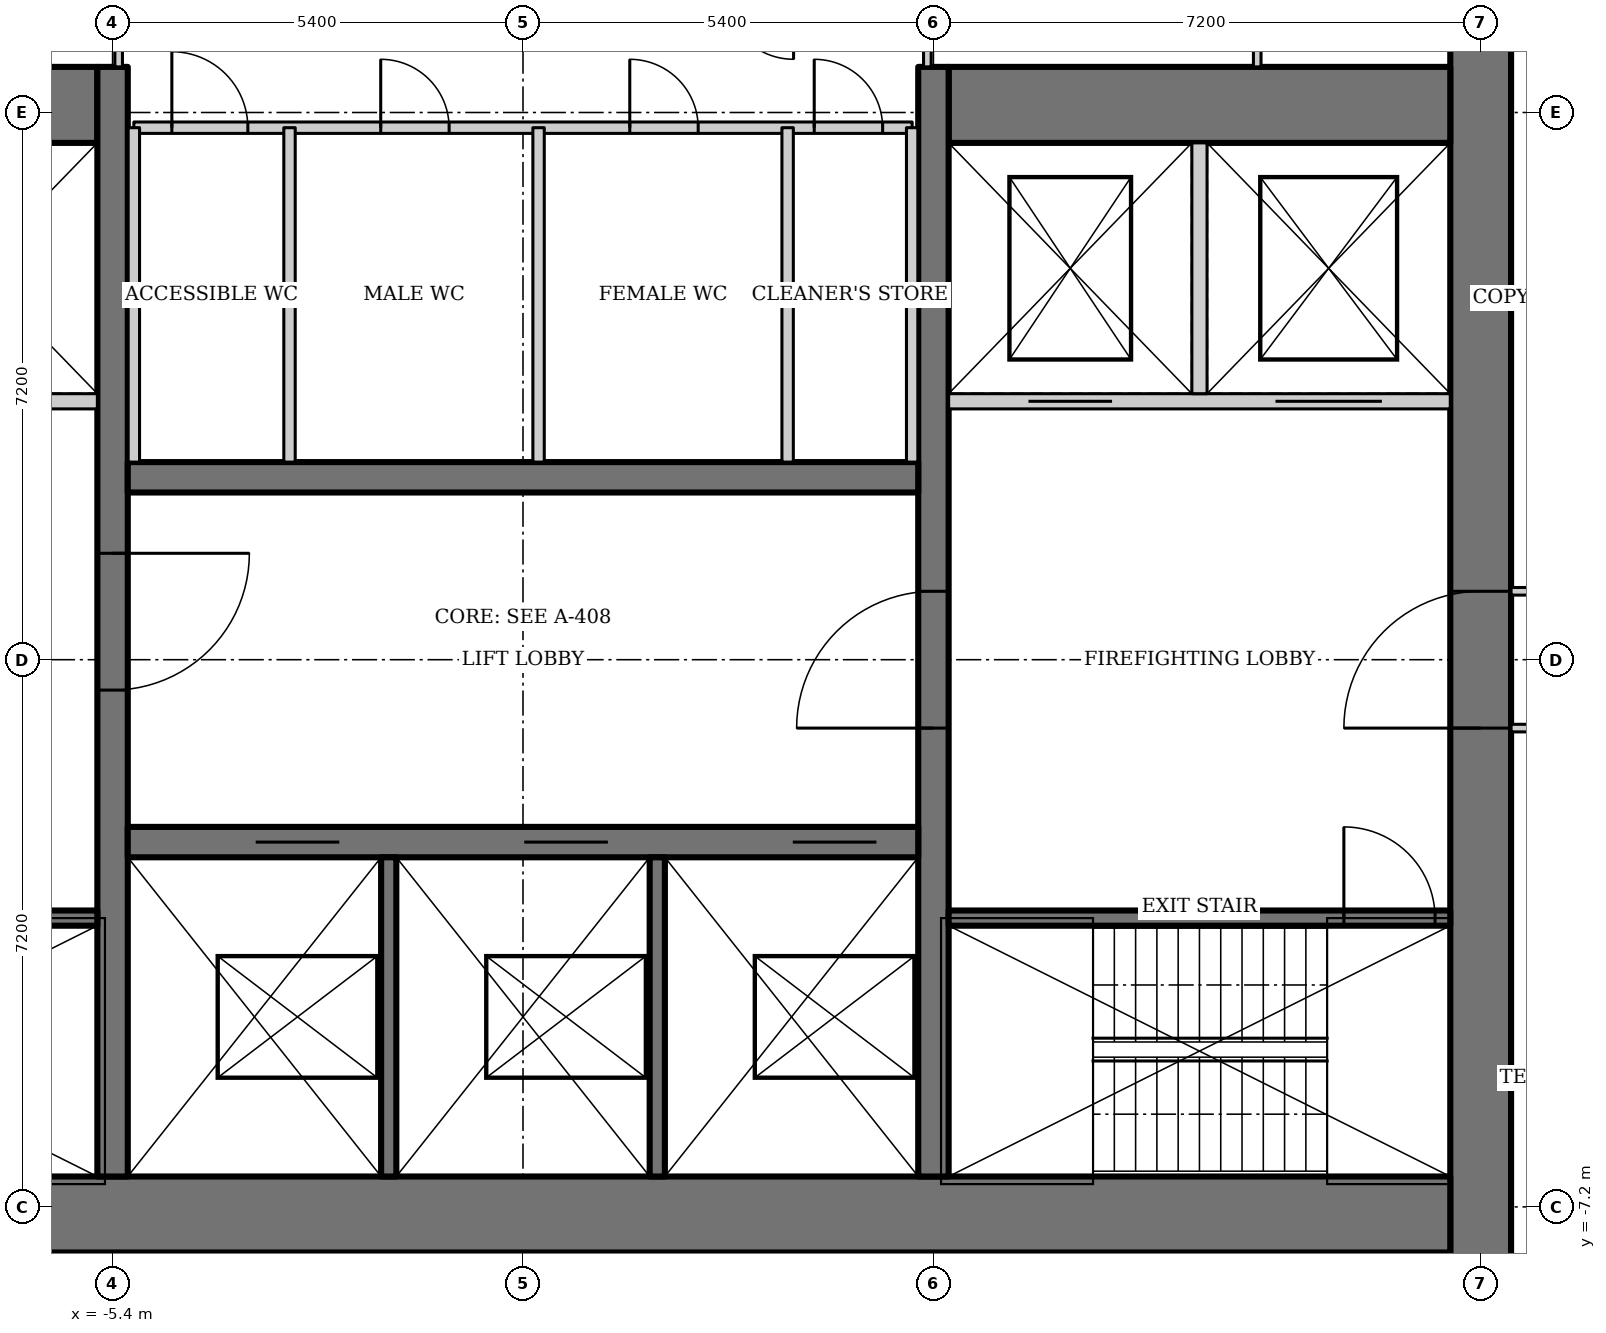
"""IFC4 building model, lengths in metres.
Left out: names, types, materials, properties, quantities, classifications, styles, units other than length and angle.
Written with IfcOpenShell. Run it as: python <this file> out.ifc"""

import sys

from ifc_helpers import new_model, si_unit, direction, frame, frame_2d, origin, place, context, subcontext, project, spatial, rectangle, extrude, element, fill, save


model = new_model("IFC4")
c1 = context("Model", 3, precision=1e-05, world=origin(), true_north=direction((0.0, 1.0)))
c2 = subcontext(c1, "Body", "Model", "MODEL_VIEW")
j1 = project(units=[si_unit("LENGTHUNIT", "METRE"), si_unit("PLANEANGLEUNIT", "RADIAN")], contexts=[c1])
p1 = place(None, origin())
s1 = spatial("IfcSite", under=j1, at=p1, CompositionType="ELEMENT")
p2 = place(p1, origin())
s2 = spatial("IfcBuilding", under=s1, at=p2, CompositionType="ELEMENT")
p3 = place(p2, frame((0.0, 0.0, 228.4)))
s3 = spatial("IfcBuildingStorey", under=s2, at=p3, CompositionType="ELEMENT", Elevation=228.4)
p4 = place(p3, frame((12.6, -13.0, 0.0), z_axis=(0.0, 0.0, 1.0), x_axis=(0.0, 1.0, 0.0)))
e1 = element("IfcWall", 1, at=p4, inside=s3, PredefinedType="SHEAR", context=c2, shape_type="SweptSolid", body=[
    extrude(rectangle(XDim=26.0, YDim=0.8, at=frame_2d((13.0, 0.0))), origin(), (0.0, 0.0, 1.0), 4.2),
])
p5 = place(p4, frame((12.1, 0.0, 0.0)))
e2 = element("IfcOpeningElement", 2, at=p5, cuts=e1, PredefinedType="OPENING", context=c2, shape_type="SweptSolid", body=[
    extrude(rectangle(XDim=1.8, YDim=2.1, at=frame_2d((0.9, 1.05))), frame((0.0, 0.41, 0.0), z_axis=(0.0, -1.0, 0.0), x_axis=(1.0, 0.0, 0.0)), (0.0, 0.0, 1.0), 0.82),
])
p6 = place(p3, frame((-12.2, -7.3, 0.0), z_axis=(0.0, 0.0, 1.0), x_axis=(1.0, 0.0, 0.0)))
e3 = element("IfcWall", 3, at=p6, inside=s3, PredefinedType="SHEAR", context=c2, shape_type="SweptSolid", body=[
    extrude(rectangle(XDim=24.4, YDim=1.0, at=frame_2d((12.2, 0.0))), origin(), (0.0, 0.0, 1.0), 4.2),
])
for number, where, z_axis, x_axis in (
    (4, (12.2, 7.3, 0.0), (0.0, 0.0, 1.0), (-1.0, 0.0, 0.0)),
    (5, (-5.6, 7.3, 0.0), (0.0, 0.0, 1.0), (-1.0, 0.0, 0.0)),
):
    element("IfcWall", number, at=place(p3, frame(where, z_axis=z_axis, x_axis=x_axis)), inside=s3, PredefinedType="SHEAR", context=c2, shape_type="SweptSolid", body=[
        extrude(rectangle(XDim=6.6, YDim=1.0, at=frame_2d((3.3, 0.0))), origin(), (0.0, 0.0, 1.0), 4.2),
    ])
p7 = place(p3, frame((5.4, -6.8, 0.0), z_axis=(0.0, 0.0, 1.0), x_axis=(0.0, 1.0, 0.0)))
e6 = element("IfcWall", 6, at=p7, inside=s3, PredefinedType="SHEAR", context=c2, shape_type="SweptSolid", body=[
    extrude(rectangle(XDim=14.6, YDim=0.4, at=frame_2d((7.3, 0.0))), origin(), (0.0, 0.0, 1.0), 4.2),
])
p8 = place(p7, frame((5.9, 0.0, 0.0)))
e7 = element("IfcOpeningElement", 7, at=p8, cuts=e6, PredefinedType="OPENING", context=c2, shape_type="SweptSolid", body=[
    extrude(rectangle(XDim=1.8, YDim=2.1, at=frame_2d((0.9, 1.05))), frame((0.0, 0.21, 0.0), z_axis=(0.0, -1.0, 0.0), x_axis=(1.0, 0.0, 0.0)), (0.0, 0.0, 1.0), 0.42),
])
p9 = place(p3, frame((-5.4, 7.8, 0.0), z_axis=(0.0, 0.0, 1.0), x_axis=(0.0, -1.0, 0.0)))
e8 = element("IfcWall", 8, at=p9, inside=s3, PredefinedType="SHEAR", context=c2, shape_type="SweptSolid", body=[
    extrude(rectangle(XDim=14.6, YDim=0.4, at=frame_2d((7.3, 0.0))), origin(), (0.0, 0.0, 1.0), 4.2),
])
p10 = place(p9, frame((6.4, 0.0, 0.0)))
e9 = element("IfcOpeningElement", 9, at=p10, cuts=e8, PredefinedType="OPENING", context=c2, shape_type="SweptSolid", body=[
    extrude(rectangle(XDim=1.8, YDim=2.1, at=frame_2d((0.9, 1.05))), frame((0.0, 0.21, 0.0), z_axis=(0.0, -1.0, 0.0), x_axis=(1.0, 0.0, 0.0)), (0.0, 0.0, 1.0), 0.42),
])
p11 = place(p3, frame((-5.2, -2.4, 0.0), z_axis=(0.0, 0.0, 1.0), x_axis=(1.0, 0.0, 0.0)))
e10 = element("IfcWall", 10, at=p11, inside=s3, PredefinedType="SHEAR", context=c2, shape_type="SweptSolid", body=[
    extrude(rectangle(XDim=10.4, YDim=0.4, at=frame_2d((5.2, 0.0))), origin(), (0.0, 0.0, 1.0), 4.2),
])
p12 = place(p11, frame((1.683, 0.0, 0.0)))
e11 = element("IfcOpeningElement", 11, at=p12, cuts=e10, PredefinedType="OPENING", context=c2, shape_type="SweptSolid", body=[
    extrude(rectangle(XDim=1.1, YDim=2.2, at=frame_2d((0.55, 1.1))), frame((0.0, 0.21, 0.0), z_axis=(0.0, -1.0, 0.0), x_axis=(1.0, 0.0, 0.0)), (0.0, 0.0, 1.0), 0.42),
])
p13 = place(p11, frame((5.217, 0.0, 0.0)))
e12 = element("IfcOpeningElement", 12, at=p13, cuts=e10, PredefinedType="OPENING", context=c2, shape_type="SweptSolid", body=[
    extrude(rectangle(XDim=1.1, YDim=2.2, at=frame_2d((0.55, 1.1))), frame((0.0, 0.21, 0.0), z_axis=(0.0, -1.0, 0.0), x_axis=(1.0, 0.0, 0.0)), (0.0, 0.0, 1.0), 0.42),
])
p14 = place(p11, frame((8.75, 0.0, 0.0)))
e13 = element("IfcOpeningElement", 13, at=p14, cuts=e10, PredefinedType="OPENING", context=c2, shape_type="SweptSolid", body=[
    extrude(rectangle(XDim=1.1, YDim=2.2, at=frame_2d((0.55, 1.1))), frame((0.0, 0.21, 0.0), z_axis=(0.0, -1.0, 0.0), x_axis=(1.0, 0.0, 0.0)), (0.0, 0.0, 1.0), 0.42),
])
for number, where, z_axis, x_axis in (
    (14, (-1.767, -2.6, 0.0), (0.0, 0.0, 1.0), (0.0, -1.0, 0.0)),
    (15, (1.767, -2.6, 0.0), (0.0, 0.0, 1.0), (0.0, -1.0, 0.0)),
):
    element("IfcWall", number, at=place(p3, frame(where, z_axis=z_axis, x_axis=x_axis)), inside=s3, PredefinedType="SOLIDWALL", context=c2, shape_type="SweptSolid", body=[
        extrude(rectangle(XDim=4.2, YDim=0.2, at=frame_2d((2.1, 0.0))), origin(), (0.0, 0.0, 1.0), 4.2),
    ])
p15 = place(p3, frame((5.2, 2.4, 0.0), z_axis=(0.0, 0.0, 1.0), x_axis=(-1.0, 0.0, 0.0)))
e16 = element("IfcWall", 16, at=p15, inside=s3, PredefinedType="SHEAR", context=c2, shape_type="SweptSolid", body=[
    extrude(rectangle(XDim=10.4, YDim=0.4, at=frame_2d((5.2, 0.0))), origin(), (0.0, 0.0, 1.0), 4.2),
])
p16 = place(p3, frame((5.6, -3.4, 0.0), z_axis=(0.0, 0.0, 1.0), x_axis=(1.0, 0.0, 0.0)))
e17 = element("IfcWall", 17, at=p16, inside=s3, PredefinedType="SHEAR", context=c2, shape_type="SweptSolid", body=[
    extrude(rectangle(XDim=6.6, YDim=0.2, at=frame_2d((3.3, 0.0))), origin(), (0.0, 0.0, 1.0), 4.2),
])
p17 = place(p16, frame((5.2, 0.0, 0.0)))
e18 = element("IfcOpeningElement", 18, at=p17, cuts=e17, PredefinedType="OPENING", context=c2, shape_type="SweptSolid", body=[
    extrude(rectangle(XDim=1.2, YDim=2.1, at=frame_2d((0.6, 1.05))), frame((0.0, 0.11, 0.0), z_axis=(0.0, -1.0, 0.0), x_axis=(1.0, 0.0, 0.0)), (0.0, 0.0, 1.0), 0.22),
])
p18 = place(p3, frame((12.2, 3.4, 0.0), z_axis=(0.0, 0.0, 1.0), x_axis=(-1.0, 0.0, 0.0)))
e19 = element("IfcWall", 19, at=p18, inside=s3, PredefinedType="SOLIDWALL", context=c2, shape_type="SweptSolid", body=[
    extrude(rectangle(XDim=6.6, YDim=0.2, at=frame_2d((3.3, 0.0))), origin(), (0.0, 0.0, 1.0), 4.2),
])
p19 = place(p18, frame((4.45, 0.0, 0.0)))
e20 = element("IfcOpeningElement", 20, at=p19, cuts=e19, PredefinedType="OPENING", context=c2, shape_type="SweptSolid", body=[
    extrude(rectangle(XDim=1.1, YDim=2.2, at=frame_2d((0.55, 1.1))), frame((0.0, 0.11, 0.0), z_axis=(0.0, -1.0, 0.0), x_axis=(1.0, 0.0, 0.0)), (0.0, 0.0, 1.0), 0.22),
])
p20 = place(p18, frame((0.9, 0.0, 0.0)))
e21 = element("IfcOpeningElement", 21, at=p20, cuts=e19, PredefinedType="OPENING", context=c2, shape_type="SweptSolid", body=[
    extrude(rectangle(XDim=1.4, YDim=2.2, at=frame_2d((0.7, 1.1))), frame((0.0, 0.11, 0.0), z_axis=(0.0, -1.0, 0.0), x_axis=(1.0, 0.0, 0.0)), (0.0, 0.0, 1.0), 0.22),
])
p21 = place(p3, frame((8.9, 3.5, 0.0), z_axis=(0.0, 0.0, 1.0), x_axis=(0.0, 1.0, 0.0)))
e22 = element("IfcWall", 22, at=p21, inside=s3, PredefinedType="SOLIDWALL", context=c2, shape_type="SweptSolid", body=[
    extrude(rectangle(XDim=3.3, YDim=0.2, at=frame_2d((1.65, 0.0))), origin(), (0.0, 0.0, 1.0), 4.2),
])
p22 = place(p3, frame((-5.6, -3.4, 0.0), z_axis=(0.0, 0.0, 1.0), x_axis=(-1.0, 0.0, 0.0)))
e23 = element("IfcWall", 23, at=p22, inside=s3, PredefinedType="SHEAR", context=c2, shape_type="SweptSolid", body=[
    extrude(rectangle(XDim=6.6, YDim=0.2, at=frame_2d((3.3, 0.0))), origin(), (0.0, 0.0, 1.0), 4.2),
])
p23 = place(p22, frame((5.2, 0.0, 0.0)))
e24 = element("IfcOpeningElement", 24, at=p23, cuts=e23, PredefinedType="OPENING", context=c2, shape_type="SweptSolid", body=[
    extrude(rectangle(XDim=1.2, YDim=2.1, at=frame_2d((0.6, 1.05))), frame((0.0, 0.11, 0.0), z_axis=(0.0, -1.0, 0.0), x_axis=(1.0, 0.0, 0.0)), (0.0, 0.0, 1.0), 0.22),
])
p24 = place(p3, frame((-12.2, 3.4, 0.0), z_axis=(0.0, 0.0, 1.0), x_axis=(1.0, 0.0, 0.0)))
e25 = element("IfcWall", 25, at=p24, inside=s3, PredefinedType="SOLIDWALL", context=c2, shape_type="SweptSolid", body=[
    extrude(rectangle(XDim=6.6, YDim=0.2, at=frame_2d((3.3, 0.0))), origin(), (0.0, 0.0, 1.0), 4.2),
])
p25 = place(p24, frame((1.05, 0.0, 0.0)))
e26 = element("IfcOpeningElement", 26, at=p25, cuts=e25, PredefinedType="OPENING", context=c2, shape_type="SweptSolid", body=[
    extrude(rectangle(XDim=1.1, YDim=2.2, at=frame_2d((0.55, 1.1))), frame((0.0, 0.11, 0.0), z_axis=(0.0, -1.0, 0.0), x_axis=(1.0, 0.0, 0.0)), (0.0, 0.0, 1.0), 0.22),
])
p26 = place(p24, frame((4.3, 0.0, 0.0)))
e27 = element("IfcOpeningElement", 27, at=p26, cuts=e25, PredefinedType="OPENING", context=c2, shape_type="SweptSolid", body=[
    extrude(rectangle(XDim=1.4, YDim=2.2, at=frame_2d((0.7, 1.1))), frame((0.0, 0.11, 0.0), z_axis=(0.0, -1.0, 0.0), x_axis=(1.0, 0.0, 0.0)), (0.0, 0.0, 1.0), 0.22),
])
p27 = place(p3, frame((-5.12, 7.0, 0.0), z_axis=(0.0, 0.0, 1.0), x_axis=(1.0, 0.0, 0.0)))
e28 = element("IfcWall", 28, at=p27, inside=s3, PredefinedType="SOLIDWALL", context=c2, shape_type="SweptSolid", body=[
    extrude(rectangle(XDim=10.24, YDim=0.15, at=frame_2d((5.12, 0.0))), origin(), (0.0, 0.0, 1.0), 4.05),
])
p28 = place(p27, frame((0.5, 0.0, 0.0)))
e29 = element("IfcOpeningElement", 29, at=p28, cuts=e28, PredefinedType="OPENING", context=c2, shape_type="SweptSolid", body=[
    extrude(rectangle(XDim=1.0, YDim=2.1, at=frame_2d((0.5, 1.05))), frame((0.0, 0.085, 0.0), z_axis=(0.0, -1.0, 0.0), x_axis=(1.0, 0.0, 0.0)), (0.0, 0.0, 1.0), 0.17),
])
p29 = place(p27, frame((3.248, 0.0, 0.0)))
e30 = element("IfcOpeningElement", 30, at=p29, cuts=e28, PredefinedType="OPENING", context=c2, shape_type="SweptSolid", body=[
    extrude(rectangle(XDim=0.9, YDim=2.1, at=frame_2d((0.45, 1.05))), frame((0.0, 0.085, 0.0), z_axis=(0.0, -1.0, 0.0), x_axis=(1.0, 0.0, 0.0)), (0.0, 0.0, 1.0), 0.17),
])
p30 = place(p27, frame((6.525, 0.0, 0.0)))
e31 = element("IfcOpeningElement", 31, at=p30, cuts=e28, PredefinedType="OPENING", context=c2, shape_type="SweptSolid", body=[
    extrude(rectangle(XDim=0.9, YDim=2.1, at=frame_2d((0.45, 1.05))), frame((0.0, 0.085, 0.0), z_axis=(0.0, -1.0, 0.0), x_axis=(1.0, 0.0, 0.0)), (0.0, 0.0, 1.0), 0.17),
])
p31 = place(p27, frame((8.952, 0.0, 0.0)))
e32 = element("IfcOpeningElement", 32, at=p31, cuts=e28, PredefinedType="OPENING", context=c2, shape_type="SweptSolid", body=[
    extrude(rectangle(XDim=0.9, YDim=2.1, at=frame_2d((0.45, 1.05))), frame((0.0, 0.085, 0.0), z_axis=(0.0, -1.0, 0.0), x_axis=(1.0, 0.0, 0.0)), (0.0, 0.0, 1.0), 0.17),
])
for number, where, z_axis, x_axis in (
    (33, (-5.12, 2.6, 0.0), (0.0, 0.0, 1.0), (0.0, 1.0, 0.0)),
    (34, (5.12, 2.6, 0.0), (0.0, 0.0, 1.0), (0.0, 1.0, 0.0)),
    (35, (-3.072, 2.6, 0.0), (0.0, 0.0, 1.0), (0.0, 1.0, 0.0)),
    (36, (0.205, 2.6, 0.0), (0.0, 0.0, 1.0), (0.0, 1.0, 0.0)),
    (37, (3.482, 2.6, 0.0), (0.0, 0.0, 1.0), (0.0, 1.0, 0.0)),
):
    element("IfcWall", number, at=place(p3, frame(where, z_axis=z_axis, x_axis=x_axis)), inside=s3, PredefinedType="SOLIDWALL", context=c2, shape_type="SweptSolid", body=[
        extrude(rectangle(XDim=4.4, YDim=0.15, at=frame_2d((2.2, 0.0))), origin(), (0.0, 0.0, 1.0), 4.05),
    ])
p32 = place(p3, frame((5.32, 7.8, 0.0), z_axis=(0.0, 0.0, 1.0), x_axis=(0.0, 1.0, 0.0)))
e38 = element("IfcWall", 38, at=p32, inside=s3, PredefinedType="PARTITIONING", context=c2, shape_type="SweptSolid", body=[
    extrude(rectangle(XDim=1.0, YDim=0.1, at=frame_2d((0.5, 0.0))), origin(), (0.0, 0.0, 1.0), 4.05),
])
p33 = place(p3, frame((9.66, 10.017, 0.0), z_axis=(0.0, 0.0, 1.0), x_axis=(0.0, -1.0, 0.0)))
e39 = element("IfcWall", 39, at=p33, inside=s3, PredefinedType="PARTITIONING", context=c2, shape_type="SweptSolid", body=[
    extrude(rectangle(XDim=2.217, YDim=0.1, at=frame_2d((1.108, 0.0))), origin(), (0.0, 0.0, 1.0), 4.05),
])
p34 = place(p3, frame((-5.32, 8.8, 0.0), z_axis=(0.0, 0.0, 1.0), x_axis=(0.0, -1.0, 0.0)))
e40 = element("IfcWall", 40, at=p34, inside=s3, PredefinedType="PARTITIONING", context=c2, shape_type="SweptSolid", body=[
    extrude(rectangle(XDim=1.0, YDim=0.1, at=frame_2d((0.5, 0.0))), origin(), (0.0, 0.0, 1.0), 4.05),
])
p35 = place(p3, frame((13.0, -0.9, 0.0), z_axis=(0.0, 0.0, 1.0), x_axis=(1.0, 0.0, 0.0)))
e41 = element("IfcWall", 41, at=p35, inside=s3, PredefinedType="PARTITIONING", context=c2, shape_type="SweptSolid", body=[
    extrude(rectangle(XDim=2.165, YDim=0.1, at=frame_2d((1.083, 0.0))), origin(), (0.0, 0.0, 1.0), 4.05),
])
p36 = place(p35, frame((1.15, 0.0, 0.0)))
e42 = element("IfcOpeningElement", 42, at=p36, cuts=e41, PredefinedType="OPENING", context=c2, shape_type="SweptSolid", body=[
    extrude(rectangle(XDim=0.9, YDim=2.1, at=frame_2d((0.45, 1.05))), frame((0.0, 0.06, 0.0), z_axis=(0.0, -1.0, 0.0), x_axis=(1.0, 0.0, 0.0)), (0.0, 0.0, 1.0), 0.12),
])
p37 = place(p3, frame((15.165, 0.9, 0.0), z_axis=(0.0, 0.0, 1.0), x_axis=(-1.0, 0.0, 0.0)))
e43 = element("IfcWall", 43, at=p37, inside=s3, PredefinedType="PARTITIONING", context=c2, shape_type="SweptSolid", body=[
    extrude(rectangle(XDim=2.165, YDim=0.1, at=frame_2d((1.083, 0.0))), origin(), (0.0, 0.0, 1.0), 4.05),
])
p38 = place(p37, frame((0.1, 0.0, 0.0)))
e44 = element("IfcOpeningElement", 44, at=p38, cuts=e43, PredefinedType="OPENING", context=c2, shape_type="SweptSolid", body=[
    extrude(rectangle(XDim=0.9, YDim=2.1, at=frame_2d((0.45, 1.05))), frame((0.0, 0.06, 0.0), z_axis=(0.0, -1.0, 0.0), x_axis=(1.0, 0.0, 0.0)), (0.0, 0.0, 1.0), 0.12),
])
p39 = place(p8, origin())
e45 = element("IfcDoor", 45, at=p39, inside=s3, OperationType="DOUBLE_DOOR_DOUBLE_SWING", PredefinedType="DOOR", context=c2, shape_type="SweptSolid", body=[
    extrude(rectangle(XDim=1.8, YDim=2.1, at=frame_2d((0.9, 1.05))), frame((0.0, 0.025, 0.0), z_axis=(0.0, -1.0, 0.0), x_axis=(1.0, 0.0, 0.0)), (0.0, 0.0, 1.0), 0.05),
])
fill(e7, e45)
p40 = place(p10, origin())
e46 = element("IfcDoor", 46, at=p40, inside=s3, OperationType="DOUBLE_DOOR_DOUBLE_SWING", PredefinedType="DOOR", context=c2, shape_type="SweptSolid", body=[
    extrude(rectangle(XDim=1.8, YDim=2.1, at=frame_2d((0.9, 1.05))), frame((0.0, 0.025, 0.0), z_axis=(0.0, -1.0, 0.0), x_axis=(1.0, 0.0, 0.0)), (0.0, 0.0, 1.0), 0.05),
])
fill(e9, e46)
p41 = place(p17, origin())
e47 = element("IfcDoor", 47, at=p41, inside=s3, OperationType="SINGLE_SWING_RIGHT", PredefinedType="DOOR", context=c2, shape_type="SweptSolid", body=[
    extrude(rectangle(XDim=1.2, YDim=2.1, at=frame_2d((0.6, 1.05))), frame((0.0, 0.025, 0.0), z_axis=(0.0, -1.0, 0.0), x_axis=(1.0, 0.0, 0.0)), (0.0, 0.0, 1.0), 0.05),
])
fill(e18, e47)
p42 = place(p5, origin())
e48 = element("IfcDoor", 48, at=p42, inside=s3, OperationType="DOUBLE_DOOR_DOUBLE_SWING", PredefinedType="DOOR", context=c2, shape_type="SweptSolid", body=[
    extrude(rectangle(XDim=1.8, YDim=2.1, at=frame_2d((0.9, 1.05))), frame((0.0, 0.025, 0.0), z_axis=(0.0, -1.0, 0.0), x_axis=(1.0, 0.0, 0.0)), (0.0, 0.0, 1.0), 0.05),
])
fill(e2, e48)
p43 = place(p12, origin())
e49 = element("IfcDoor", 49, at=p43, inside=s3, OperationType="DOUBLE_DOOR_SLIDING", PredefinedType="DOOR", context=c2, shape_type="SweptSolid", body=[
    extrude(rectangle(XDim=1.1, YDim=2.2, at=frame_2d((0.55, 1.1))), frame((0.0, 0.025, 0.0), z_axis=(0.0, -1.0, 0.0), x_axis=(1.0, 0.0, 0.0)), (0.0, 0.0, 1.0), 0.05),
])
fill(e11, e49)
p44 = place(p13, origin())
e50 = element("IfcDoor", 50, at=p44, inside=s3, OperationType="DOUBLE_DOOR_SLIDING", PredefinedType="DOOR", context=c2, shape_type="SweptSolid", body=[
    extrude(rectangle(XDim=1.1, YDim=2.2, at=frame_2d((0.55, 1.1))), frame((0.0, 0.025, 0.0), z_axis=(0.0, -1.0, 0.0), x_axis=(1.0, 0.0, 0.0)), (0.0, 0.0, 1.0), 0.05),
])
fill(e12, e50)
p45 = place(p14, origin())
e51 = element("IfcDoor", 51, at=p45, inside=s3, OperationType="DOUBLE_DOOR_SLIDING", PredefinedType="DOOR", context=c2, shape_type="SweptSolid", body=[
    extrude(rectangle(XDim=1.1, YDim=2.2, at=frame_2d((0.55, 1.1))), frame((0.0, 0.025, 0.0), z_axis=(0.0, -1.0, 0.0), x_axis=(1.0, 0.0, 0.0)), (0.0, 0.0, 1.0), 0.05),
])
fill(e13, e51)
p46 = place(p19, origin())
e52 = element("IfcDoor", 52, at=p46, inside=s3, OperationType="DOUBLE_DOOR_SLIDING", PredefinedType="DOOR", context=c2, shape_type="SweptSolid", body=[
    extrude(rectangle(XDim=1.1, YDim=2.2, at=frame_2d((0.55, 1.1))), frame((0.0, 0.025, 0.0), z_axis=(0.0, -1.0, 0.0), x_axis=(1.0, 0.0, 0.0)), (0.0, 0.0, 1.0), 0.05),
])
fill(e20, e52)
p47 = place(p20, origin())
e53 = element("IfcDoor", 53, at=p47, inside=s3, OperationType="DOUBLE_DOOR_SLIDING", PredefinedType="DOOR", context=c2, shape_type="SweptSolid", body=[
    extrude(rectangle(XDim=1.4, YDim=2.2, at=frame_2d((0.7, 1.1))), frame((0.0, 0.025, 0.0), z_axis=(0.0, -1.0, 0.0), x_axis=(1.0, 0.0, 0.0)), (0.0, 0.0, 1.0), 0.05),
])
fill(e21, e53)
p48 = place(p28, origin())
e54 = element("IfcDoor", 54, at=p48, inside=s3, OperationType="SINGLE_SWING_LEFT", PredefinedType="DOOR", context=c2, shape_type="SweptSolid", body=[
    extrude(rectangle(XDim=1.0, YDim=2.1, at=frame_2d((0.5, 1.05))), frame((0.0, 0.025, 0.0), z_axis=(0.0, -1.0, 0.0), x_axis=(1.0, 0.0, 0.0)), (0.0, 0.0, 1.0), 0.05),
])
fill(e29, e54)
p49 = place(p29, origin())
e55 = element("IfcDoor", 55, at=p49, inside=s3, OperationType="SINGLE_SWING_LEFT", PredefinedType="DOOR", context=c2, shape_type="SweptSolid", body=[
    extrude(rectangle(XDim=0.9, YDim=2.1, at=frame_2d((0.45, 1.05))), frame((0.0, 0.025, 0.0), z_axis=(0.0, -1.0, 0.0), x_axis=(1.0, 0.0, 0.0)), (0.0, 0.0, 1.0), 0.05),
])
fill(e30, e55)
p50 = place(p30, origin())
e56 = element("IfcDoor", 56, at=p50, inside=s3, OperationType="SINGLE_SWING_LEFT", PredefinedType="DOOR", context=c2, shape_type="SweptSolid", body=[
    extrude(rectangle(XDim=0.9, YDim=2.1, at=frame_2d((0.45, 1.05))), frame((0.0, 0.025, 0.0), z_axis=(0.0, -1.0, 0.0), x_axis=(1.0, 0.0, 0.0)), (0.0, 0.0, 1.0), 0.05),
])
fill(e31, e56)
p51 = place(p31, origin())
e57 = element("IfcDoor", 57, at=p51, inside=s3, OperationType="SINGLE_SWING_LEFT", PredefinedType="DOOR", context=c2, shape_type="SweptSolid", body=[
    extrude(rectangle(XDim=0.9, YDim=2.1, at=frame_2d((0.45, 1.05))), frame((0.0, 0.025, 0.0), z_axis=(0.0, -1.0, 0.0), x_axis=(1.0, 0.0, 0.0)), (0.0, 0.0, 1.0), 0.05),
])
fill(e32, e57)
save(model, sys.argv[1])
